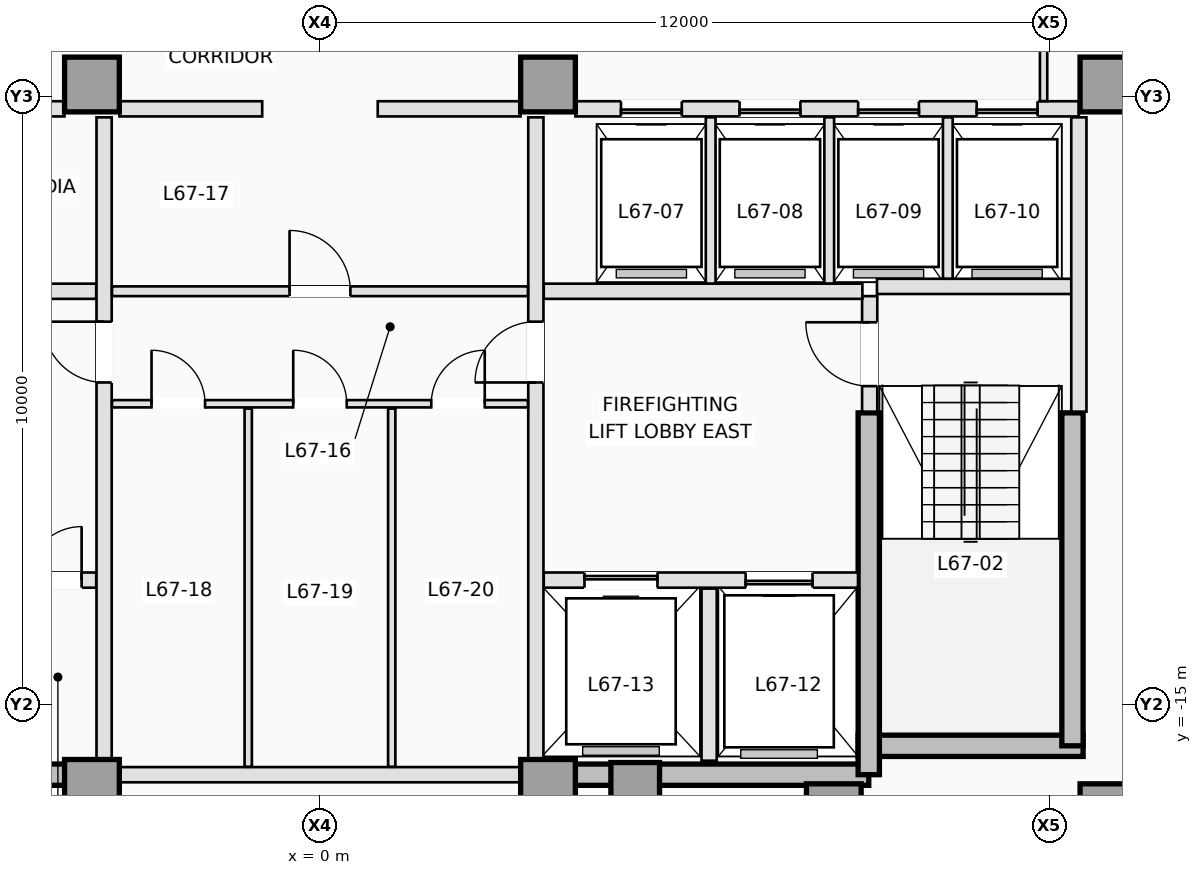
"""IFC4 building model, lengths in metres.
Left out: names, types, materials, properties, quantities, classifications, styles, units other than length and angle.
Written with IfcOpenShell. Run it as: python <this file> out.ifc"""

import sys

from ifc_helpers import new_model, si_unit, direction, frame, frame_2d, origin, origin_2d, place, context, subcontext, project, spatial, rectangle, extrude, element, fill, save


model = new_model("IFC4")
c1 = context("Model", 3, precision=1e-05, world=origin(), true_north=direction((0.0, 1.0)))
c2 = subcontext(c1, "Body", "Model", "MODEL_VIEW")
j1 = project(units=[si_unit("LENGTHUNIT", "METRE"), si_unit("PLANEANGLEUNIT", "RADIAN")], contexts=[c1])
p1 = place(None, origin())
s1 = spatial("IfcSite", under=j1, at=p1, CompositionType="ELEMENT")
p2 = place(p1, origin())
s2 = spatial("IfcBuilding", under=s1, at=p2, CompositionType="ELEMENT")
p3 = place(p2, frame((0.0, 0.0, 242.9)))
s3 = spatial("IfcBuildingStorey", under=s2, at=p3, CompositionType="ELEMENT", Elevation=242.9)
for number, where, z_axis, x_axis in (
    (1, (-9.025, -16.15, 0.0), (0.0, 0.0, 1.0), (1.0, 0.0, 0.0)),
    (2, (3.75, -16.15, 0.0), (0.0, 0.0, 1.0), (1.0, 0.0, 0.0)),
):
    element("IfcWall", number, at=place(p3, frame(where, z_axis=z_axis, x_axis=x_axis)), inside=s3, PredefinedType="SHEAR", context=c2, shape_type="SweptSolid", body=[
        extrude(rectangle(XDim=5.275, YDim=0.35, at=frame_2d((2.637, 0.0))), origin(), (0.0, 0.0, 1.0), 3.5),
    ])
p4 = place(p3, frame((8.85, -15.675, 0.0), z_axis=(0.0, 0.0, 1.0), x_axis=(1.0, 0.0, 0.0)))
e3 = element("IfcWall", 3, at=p4, inside=s3, PredefinedType="SHEAR", context=c2, shape_type="SweptSolid", body=[
    extrude(rectangle(XDim=3.7, YDim=0.35, at=frame_2d((1.85, 0.0))), origin(), (0.0, 0.0, 1.0), 3.5),
])
p5 = place(p3, frame((12.375, -15.675, 0.0), z_axis=(0.0, 0.0, 1.0), x_axis=(0.0, 1.0, 0.0)))
e4 = element("IfcWall", 4, at=p5, inside=s3, PredefinedType="SHEAR", context=c2, shape_type="SweptSolid", body=[
    extrude(rectangle(XDim=5.475, YDim=0.35, at=frame_2d((2.738, 0.0))), origin(), (0.0, 0.0, 1.0), 3.5),
])
p6 = place(p3, frame((9.025, -16.15, 0.0), z_axis=(0.0, 0.0, 1.0), x_axis=(0.0, 1.0, 0.0)))
e5 = element("IfcWall", 5, at=p6, inside=s3, PredefinedType="SHEAR", context=c2, shape_type="SweptSolid", body=[
    extrude(rectangle(XDim=5.95, YDim=0.35, at=frame_2d((2.975, 0.0))), origin(), (0.0, 0.0, 1.0), 3.5),
])
for number, where, z_axis, x_axis in (
    (6, (-3.75, -16.35, 0.0), (0.0, 0.0, 1.0), (1.0, 0.0, 0.0)),
    (7, (3.75, -16.35, 0.0), (0.0, 0.0, 1.0), (1.0, 0.0, 0.0)),
    (8, (8.45, -16.75, 0.0), (0.0, 0.0, 1.0), (1.0, 0.0, 0.0)),
    (9, (12.95, -16.75, 0.0), (0.0, 0.0, 1.0), (1.0, 0.0, 0.0)),
    (10, (-3.75, -4.8, 0.0), (0.0, 0.0, 1.0), (1.0, 0.0, 0.0)),
    (11, (3.75, -4.8, 0.0), (0.0, 0.0, 1.0), (1.0, 0.0, 0.0)),
    (12, (12.95, -4.8, 0.0), (0.0, 0.0, 1.0), (1.0, 0.0, 0.0)),
):
    element("IfcColumn", number, at=place(p3, frame(where, z_axis=z_axis, x_axis=x_axis)), inside=s3, PredefinedType="COLUMN", context=c2, shape_type="SweptSolid", body=[
        extrude(rectangle(XDim=0.9, YDim=0.9, at=origin_2d()), origin(), (0.0, 0.0, 1.0), 3.5),
    ])
p7 = place(p3, frame((5.184, -16.35, 0.0), z_axis=(0.0, 0.0, 1.0), x_axis=(0.0, 1.0, 0.0)))
e13 = element("IfcColumn", 13, at=p7, inside=s3, PredefinedType="COLUMN", context=c2, shape_type="SweptSolid", body=[
    extrude(rectangle(XDim=0.8, YDim=0.8, at=origin_2d()), origin(), (0.0, 0.0, 1.0), 3.5),
])
p8 = place(p3, frame((9.04, -10.18, 0.0), z_axis=(0.0, 0.0, 1.0), x_axis=(0.0, 1.0, 0.0)))
e14 = element("IfcWall", 14, at=p8, inside=s3, PredefinedType="PARTITIONING", context=c2, shape_type="SweptSolid", body=[
    extrude(rectangle(XDim=1.9, YDim=0.25, at=frame_2d((0.95, 0.0))), origin(), (0.0, 0.0, 1.0), 3.25),
])
p9 = place(p8, frame((0.42, 0.0, 0.0)))
e15 = element("IfcOpeningElement", 15, at=p9, cuts=e14, PredefinedType="OPENING", context=c2, shape_type="SweptSolid", body=[
    extrude(rectangle(XDim=1.05, YDim=2.15, at=frame_2d((0.525, 1.075))), frame((0.0, 0.135, 0.0), z_axis=(0.0, -1.0, 0.0), x_axis=(1.0, 0.0, 0.0)), (0.0, 0.0, 1.0), 0.27),
])
p10 = place(p3, frame((9.16, -8.12, 0.0), z_axis=(0.0, 0.0, 1.0), x_axis=(1.0, 0.0, 0.0)))
e16 = element("IfcWall", 16, at=p10, inside=s3, PredefinedType="PARTITIONING", context=c2, shape_type="SweptSolid", body=[
    extrude(rectangle(XDim=3.22, YDim=0.25, at=frame_2d((1.61, 0.0))), origin(), (0.0, 0.0, 1.0), 3.25),
])
p11 = place(p3, frame((12.48, -10.18, 0.0), z_axis=(0.0, 0.0, 1.0), x_axis=(0.0, 1.0, 0.0)))
e17 = element("IfcWall", 17, at=p11, inside=s3, PredefinedType="PARTITIONING", context=c2, shape_type="SweptSolid", body=[
    extrude(rectangle(XDim=4.84, YDim=0.25, at=frame_2d((2.42, 0.0))), origin(), (0.0, 0.0, 1.0), 3.25),
])
p12 = place(p3, frame((-8.848, -12.95, 0.0), z_axis=(0.0, 0.0, 1.0), x_axis=(1.0, 0.0, 0.0)))
e18 = element("IfcWall", 18, at=p12, inside=s3, PredefinedType="PARTITIONING", context=c2, shape_type="SweptSolid", body=[
    extrude(rectangle(XDim=5.168, YDim=0.25, at=frame_2d((2.584, 0.0))), origin(), (0.0, 0.0, 1.0), 3.25),
])
p13 = place(p12, frame((0.748, 0.0, 0.0)))
e19 = element("IfcOpeningElement", 19, at=p13, cuts=e18, PredefinedType="OPENING", context=c2, shape_type="SweptSolid", body=[
    extrude(rectangle(XDim=1.1, YDim=2.15, at=frame_2d((0.55, 1.075))), frame((0.0, 0.135, 0.0), z_axis=(0.0, -1.0, 0.0), x_axis=(1.0, 0.0, 0.0)), (0.0, 0.0, 1.0), 0.27),
])
p14 = place(p12, frame((2.648, 0.0, 0.0)))
e20 = element("IfcOpeningElement", 20, at=p14, cuts=e18, PredefinedType="OPENING", context=c2, shape_type="SweptSolid", body=[
    extrude(rectangle(XDim=0.88, YDim=2.1, at=frame_2d((0.44, 1.05))), frame((0.0, 0.135, 0.0), z_axis=(0.0, -1.0, 0.0), x_axis=(1.0, 0.0, 0.0)), (0.0, 0.0, 1.0), 0.27),
])
p15 = place(p12, frame((4.048, 0.0, 0.0)))
e21 = element("IfcOpeningElement", 21, at=p15, cuts=e18, PredefinedType="OPENING", context=c2, shape_type="SweptSolid", body=[
    extrude(rectangle(XDim=0.88, YDim=2.1, at=frame_2d((0.44, 1.05))), frame((0.0, 0.135, 0.0), z_axis=(0.0, -1.0, 0.0), x_axis=(1.0, 0.0, 0.0)), (0.0, 0.0, 1.0), 0.27),
])
p16 = place(p3, frame((3.68, -12.95, 0.0), z_axis=(0.0, 0.0, 1.0), x_axis=(1.0, 0.0, 0.0)))
e22 = element("IfcWall", 22, at=p16, inside=s3, PredefinedType="PARTITIONING", context=c2, shape_type="SweptSolid", body=[
    extrude(rectangle(XDim=5.168, YDim=0.25, at=frame_2d((2.584, 0.0))), origin(), (0.0, 0.0, 1.0), 3.25),
])
p17 = place(p16, frame((3.32, 0.0, 0.0)))
e23 = element("IfcOpeningElement", 23, at=p17, cuts=e22, PredefinedType="OPENING", context=c2, shape_type="SweptSolid", body=[
    extrude(rectangle(XDim=1.1, YDim=2.15, at=frame_2d((0.55, 1.075))), frame((0.0, 0.135, 0.0), z_axis=(0.0, -1.0, 0.0), x_axis=(1.0, 0.0, 0.0)), (0.0, 0.0, 1.0), 0.27),
])
p18 = place(p16, frame((0.67, 0.0, 0.0)))
e24 = element("IfcOpeningElement", 24, at=p18, cuts=e22, PredefinedType="OPENING", context=c2, shape_type="SweptSolid", body=[
    extrude(rectangle(XDim=1.2, YDim=2.15, at=frame_2d((0.6, 1.075))), frame((0.0, 0.135, 0.0), z_axis=(0.0, -1.0, 0.0), x_axis=(1.0, 0.0, 0.0)), (0.0, 0.0, 1.0), 0.27),
])
p19 = place(p3, frame((6.4, -15.92, 0.0), z_axis=(0.0, 0.0, 1.0), x_axis=(0.0, 1.0, 0.0)))
e25 = element("IfcWall", 25, at=p19, inside=s3, PredefinedType="PARTITIONING", context=c2, shape_type="SweptSolid", body=[
    extrude(rectangle(XDim=2.83, YDim=0.25, at=frame_2d((1.415, 0.0))), origin(), (0.0, 0.0, 1.0), 3.25),
])
for number, where, z_axis, x_axis in (
    (26, (-8.92, -8.2, 0.0), (0.0, 0.0, 1.0), (1.0, 0.0, 0.0)),
    (27, (3.68, -8.2, 0.0), (0.0, 0.0, 1.0), (1.0, 0.0, 0.0)),
):
    element("IfcWall", number, at=place(p3, frame(where, z_axis=z_axis, x_axis=x_axis)), inside=s3, PredefinedType="PARTITIONING", context=c2, shape_type="SweptSolid", body=[
        extrude(rectangle(XDim=5.24, YDim=0.25, at=frame_2d((2.62, 0.0))), origin(), (0.0, 0.0, 1.0), 3.25),
    ])
p20 = place(p3, frame((-3.55, -15.898, 0.0), z_axis=(0.0, 0.0, 1.0), x_axis=(0.0, 1.0, 0.0)))
e28 = element("IfcWall", 28, at=p20, inside=s3, PredefinedType="PARTITIONING", context=c2, shape_type="SweptSolid", body=[
    extrude(rectangle(XDim=10.558, YDim=0.25, at=frame_2d((5.279, 0.0))), origin(), (0.0, 0.0, 1.0), 3.25),
])
p21 = place(p20, frame((6.198, 0.0, 0.0)))
e29 = element("IfcOpeningElement", 29, at=p21, cuts=e28, PredefinedType="OPENING", context=c2, shape_type="SweptSolid", body=[
    extrude(rectangle(XDim=1.0, YDim=2.15, at=frame_2d((0.5, 1.075))), frame((0.0, 0.135, 0.0), z_axis=(0.0, -1.0, 0.0), x_axis=(1.0, 0.0, 0.0)), (0.0, 0.0, 1.0), 0.27),
])
p22 = place(p3, frame((3.55, -15.898, 0.0), z_axis=(0.0, 0.0, 1.0), x_axis=(0.0, 1.0, 0.0)))
e30 = element("IfcWall", 30, at=p22, inside=s3, PredefinedType="PARTITIONING", context=c2, shape_type="SweptSolid", body=[
    extrude(rectangle(XDim=10.558, YDim=0.25, at=frame_2d((5.279, 0.0))), origin(), (0.0, 0.0, 1.0), 3.25),
])
p23 = place(p22, frame((6.198, 0.0, 0.0)))
e31 = element("IfcOpeningElement", 31, at=p23, cuts=e30, PredefinedType="OPENING", context=c2, shape_type="SweptSolid", body=[
    extrude(rectangle(XDim=1.0, YDim=2.15, at=frame_2d((0.5, 1.075))), frame((0.0, 0.135, 0.0), z_axis=(0.0, -1.0, 0.0), x_axis=(1.0, 0.0, 0.0)), (0.0, 0.0, 1.0), 0.27),
])
p24 = place(p3, frame((-12.48, -5.2, 0.0), z_axis=(0.0, 0.0, 1.0), x_axis=(1.0, 0.0, 0.0)))
e32 = element("IfcWall", 32, at=p24, inside=s3, PredefinedType="PARTITIONING", context=c2, shape_type="SweptSolid", body=[
    extrude(rectangle(XDim=8.278, YDim=0.25, at=frame_2d((4.139, 0.0))), origin(), (0.0, 0.0, 1.0), 3.25),
])
p25 = place(p24, frame((3.05, 0.0, 0.0)))
e33 = element("IfcOpeningElement", 33, at=p25, cuts=e32, PredefinedType="OPENING", context=c2, shape_type="SweptSolid", body=[
    extrude(rectangle(XDim=0.92, YDim=2.12, at=frame_2d((0.46, 1.06))), frame((0.0, 0.135, 0.0), z_axis=(0.0, -1.0, 0.0), x_axis=(1.0, 0.0, 0.0)), (0.0, 0.0, 1.0), 0.27),
])
p26 = place(p24, frame((6.15, 0.0, 0.0)))
e34 = element("IfcOpeningElement", 34, at=p26, cuts=e32, PredefinedType="OPENING", context=c2, shape_type="SweptSolid", body=[
    extrude(rectangle(XDim=0.92, YDim=2.12, at=frame_2d((0.46, 1.06))), frame((0.0, 0.135, 0.0), z_axis=(0.0, -1.0, 0.0), x_axis=(1.0, 0.0, 0.0)), (0.0, 0.0, 1.0), 0.27),
])
p27 = place(p3, frame((4.202, -5.2, 0.0), z_axis=(0.0, 0.0, 1.0), x_axis=(1.0, 0.0, 0.0)))
e35 = element("IfcWall", 35, at=p27, inside=s3, PredefinedType="PARTITIONING", context=c2, shape_type="SweptSolid", body=[
    extrude(rectangle(XDim=8.278, YDim=0.25, at=frame_2d((4.139, 0.0))), origin(), (0.0, 0.0, 1.0), 3.25),
])
p28 = place(p27, frame((0.748, 0.0, 0.0)))
e36 = element("IfcOpeningElement", 36, at=p28, cuts=e35, PredefinedType="OPENING", context=c2, shape_type="SweptSolid", body=[
    extrude(rectangle(XDim=1.0, YDim=2.15, at=frame_2d((0.5, 1.075))), frame((0.0, 0.135, 0.0), z_axis=(0.0, -1.0, 0.0), x_axis=(1.0, 0.0, 0.0)), (0.0, 0.0, 1.0), 0.27),
])
p29 = place(p27, frame((2.698, 0.0, 0.0)))
e37 = element("IfcOpeningElement", 37, at=p29, cuts=e35, PredefinedType="OPENING", context=c2, shape_type="SweptSolid", body=[
    extrude(rectangle(XDim=1.0, YDim=2.15, at=frame_2d((0.5, 1.075))), frame((0.0, 0.135, 0.0), z_axis=(0.0, -1.0, 0.0), x_axis=(1.0, 0.0, 0.0)), (0.0, 0.0, 1.0), 0.27),
])
p30 = place(p27, frame((4.648, 0.0, 0.0)))
e38 = element("IfcOpeningElement", 38, at=p30, cuts=e35, PredefinedType="OPENING", context=c2, shape_type="SweptSolid", body=[
    extrude(rectangle(XDim=1.0, YDim=2.15, at=frame_2d((0.5, 1.075))), frame((0.0, 0.135, 0.0), z_axis=(0.0, -1.0, 0.0), x_axis=(1.0, 0.0, 0.0)), (0.0, 0.0, 1.0), 0.27),
])
p31 = place(p27, frame((6.598, 0.0, 0.0)))
e39 = element("IfcOpeningElement", 39, at=p31, cuts=e35, PredefinedType="OPENING", context=c2, shape_type="SweptSolid", body=[
    extrude(rectangle(XDim=1.0, YDim=2.15, at=frame_2d((0.5, 1.075))), frame((0.0, 0.135, 0.0), z_axis=(0.0, -1.0, 0.0), x_axis=(1.0, 0.0, 0.0)), (0.0, 0.0, 1.0), 0.27),
])
for number, where, z_axis, x_axis in (
    (40, (-3.298, -5.2, 0.0), (0.0, 0.0, 1.0), (1.0, 0.0, 0.0)),
    (41, (0.95, -5.2, 0.0), (0.0, 0.0, 1.0), (1.0, 0.0, 0.0)),
):
    element("IfcWall", number, at=place(p3, frame(where, z_axis=z_axis, x_axis=x_axis)), inside=s3, PredefinedType="PARTITIONING", context=c2, shape_type="SweptSolid", body=[
        extrude(rectangle(XDim=2.348, YDim=0.25, at=frame_2d((1.174, 0.0))), origin(), (0.0, 0.0, 1.0), 3.25),
    ])
for number, where, z_axis, x_axis in (
    (42, (6.425, -8.073, 0.0), (0.0, 0.0, 1.0), (0.0, 1.0, 0.0)),
    (43, (8.375, -8.073, 0.0), (0.0, 0.0, 1.0), (0.0, 1.0, 0.0)),
):
    element("IfcWall", number, at=place(p3, frame(where, z_axis=z_axis, x_axis=x_axis)), inside=s3, PredefinedType="PARTITIONING", context=c2, shape_type="SweptSolid", body=[
        extrude(rectangle(XDim=2.733, YDim=0.16, at=frame_2d((1.366, 0.0))), origin(), (0.0, 0.0, 1.0), 3.25),
    ])
p32 = place(p3, frame((10.325, -7.993, 0.0), z_axis=(0.0, 0.0, 1.0), x_axis=(0.0, 1.0, 0.0)))
e44 = element("IfcWall", 44, at=p32, inside=s3, PredefinedType="PARTITIONING", context=c2, shape_type="SweptSolid", body=[
    extrude(rectangle(XDim=2.653, YDim=0.16, at=frame_2d((1.326, 0.0))), origin(), (0.0, 0.0, 1.0), 3.25),
])
p33 = place(p3, frame((-3.298, -16.15, 0.0), z_axis=(0.0, 0.0, 1.0), x_axis=(1.0, 0.0, 0.0)))
e45 = element("IfcWall", 45, at=p33, inside=s3, PredefinedType="PARTITIONING", context=c2, shape_type="SweptSolid", body=[
    extrude(rectangle(XDim=6.596, YDim=0.25, at=frame_2d((3.298, 0.0))), origin(), (0.0, 0.0, 1.0), 2.844),
])
p34 = place(p3, frame((-3.42, -8.2, 0.0), z_axis=(0.0, 0.0, 1.0), x_axis=(1.0, 0.0, 0.0)))
e46 = element("IfcWall", 46, at=p34, inside=s3, PredefinedType="PARTITIONING", context=c2, shape_type="SweptSolid", body=[
    extrude(rectangle(XDim=6.84, YDim=0.16, at=frame_2d((3.42, 0.0))), origin(), (0.0, 0.0, 1.0), 3.25),
])
p35 = place(p34, frame((2.92, 0.0, 0.0)))
e47 = element("IfcOpeningElement", 47, at=p35, cuts=e46, PredefinedType="OPENING", context=c2, shape_type="SweptSolid", body=[
    extrude(rectangle(XDim=1.0, YDim=2.15, at=frame_2d((0.5, 1.075))), frame((0.0, 0.09, 0.0), z_axis=(0.0, -1.0, 0.0), x_axis=(1.0, 0.0, 0.0)), (0.0, 0.0, 1.0), 0.18),
])
p36 = place(p3, frame((-3.42, -10.05, 0.0), z_axis=(0.0, 0.0, 1.0), x_axis=(1.0, 0.0, 0.0)))
e48 = element("IfcWall", 48, at=p36, inside=s3, PredefinedType="PARTITIONING", context=c2, shape_type="SweptSolid", body=[
    extrude(rectangle(XDim=6.84, YDim=0.12, at=frame_2d((3.42, 0.0))), origin(), (0.0, 0.0, 1.0), 3.25),
])
p37 = place(p36, frame((0.65, 0.0, 0.0)))
e49 = element("IfcOpeningElement", 49, at=p37, cuts=e48, PredefinedType="OPENING", context=c2, shape_type="SweptSolid", body=[
    extrude(rectangle(XDim=0.88, YDim=2.12, at=frame_2d((0.44, 1.06))), frame((0.0, 0.07, 0.0), z_axis=(0.0, -1.0, 0.0), x_axis=(1.0, 0.0, 0.0)), (0.0, 0.0, 1.0), 0.14),
])
p38 = place(p36, frame((2.98, 0.0, 0.0)))
e50 = element("IfcOpeningElement", 50, at=p38, cuts=e48, PredefinedType="OPENING", context=c2, shape_type="SweptSolid", body=[
    extrude(rectangle(XDim=0.88, YDim=2.12, at=frame_2d((0.44, 1.06))), frame((0.0, 0.07, 0.0), z_axis=(0.0, -1.0, 0.0), x_axis=(1.0, 0.0, 0.0)), (0.0, 0.0, 1.0), 0.14),
])
p39 = place(p36, frame((5.25, 0.0, 0.0)))
e51 = element("IfcOpeningElement", 51, at=p39, cuts=e48, PredefinedType="OPENING", context=c2, shape_type="SweptSolid", body=[
    extrude(rectangle(XDim=0.88, YDim=2.12, at=frame_2d((0.44, 1.06))), frame((0.0, 0.07, 0.0), z_axis=(0.0, -1.0, 0.0), x_axis=(1.0, 0.0, 0.0)), (0.0, 0.0, 1.0), 0.14),
])
for number, where, z_axis, x_axis in (
    (52, (-1.18, -16.02, 0.0), (0.0, 0.0, 1.0), (0.0, 1.0, 0.0)),
    (53, (1.18, -16.02, 0.0), (0.0, 0.0, 1.0), (0.0, 1.0, 0.0)),
):
    element("IfcWall", number, at=place(p3, frame(where, z_axis=z_axis, x_axis=x_axis)), inside=s3, PredefinedType="PARTITIONING", context=c2, shape_type="SweptSolid", body=[
        extrude(rectangle(XDim=5.89, YDim=0.12, at=frame_2d((2.945, 0.0))), origin(), (0.0, 0.0, 1.0), 3.25),
    ])
p40 = place(p3, frame((11.9, -2.792, 0.0), z_axis=(0.0, 0.0, 1.0), x_axis=(0.0, -1.0, 0.0)))
e54 = element("IfcWall", 54, at=p40, inside=s3, PredefinedType="PARTITIONING", context=c2, shape_type="SweptSolid", body=[
    extrude(rectangle(XDim=2.281, YDim=0.12, at=frame_2d((1.141, 0.0))), origin(), (0.0, 0.0, 1.0), 3.25),
])
p41 = place(p28, origin())
e55 = element("IfcDoor", 55, at=p41, inside=s3, OperationType="SLIDING_TO_RIGHT", PredefinedType="DOOR", context=c2, shape_type="SweptSolid", body=[
    extrude(rectangle(XDim=1.0, YDim=2.15, at=frame_2d((0.5, 1.075))), frame((0.0, 0.025, 0.0), z_axis=(0.0, -1.0, 0.0), x_axis=(1.0, 0.0, 0.0)), (0.0, 0.0, 1.0), 0.05),
])
fill(e36, e55)
p42 = place(p29, origin())
e56 = element("IfcDoor", 56, at=p42, inside=s3, OperationType="SLIDING_TO_RIGHT", PredefinedType="DOOR", context=c2, shape_type="SweptSolid", body=[
    extrude(rectangle(XDim=1.0, YDim=2.15, at=frame_2d((0.5, 1.075))), frame((0.0, 0.025, 0.0), z_axis=(0.0, -1.0, 0.0), x_axis=(1.0, 0.0, 0.0)), (0.0, 0.0, 1.0), 0.05),
])
fill(e37, e56)
p43 = place(p30, origin())
e57 = element("IfcDoor", 57, at=p43, inside=s3, OperationType="SLIDING_TO_RIGHT", PredefinedType="DOOR", context=c2, shape_type="SweptSolid", body=[
    extrude(rectangle(XDim=1.0, YDim=2.15, at=frame_2d((0.5, 1.075))), frame((0.0, 0.025, 0.0), z_axis=(0.0, -1.0, 0.0), x_axis=(1.0, 0.0, 0.0)), (0.0, 0.0, 1.0), 0.05),
])
fill(e38, e57)
p44 = place(p31, origin())
e58 = element("IfcDoor", 58, at=p44, inside=s3, OperationType="SLIDING_TO_RIGHT", PredefinedType="DOOR", context=c2, shape_type="SweptSolid", body=[
    extrude(rectangle(XDim=1.0, YDim=2.15, at=frame_2d((0.5, 1.075))), frame((0.0, 0.025, 0.0), z_axis=(0.0, -1.0, 0.0), x_axis=(1.0, 0.0, 0.0)), (0.0, 0.0, 1.0), 0.05),
])
fill(e39, e58)
p45 = place(p17, origin())
e59 = element("IfcDoor", 59, at=p45, inside=s3, OperationType="SLIDING_TO_RIGHT", PredefinedType="DOOR", context=c2, shape_type="SweptSolid", body=[
    extrude(rectangle(XDim=1.1, YDim=2.15, at=frame_2d((0.55, 1.075))), frame((0.0, 0.025, 0.0), z_axis=(0.0, -1.0, 0.0), x_axis=(1.0, 0.0, 0.0)), (0.0, 0.0, 1.0), 0.05),
])
fill(e23, e59)
p46 = place(p18, origin())
e60 = element("IfcDoor", 60, at=p46, inside=s3, OperationType="SLIDING_TO_LEFT", PredefinedType="DOOR", context=c2, shape_type="SweptSolid", body=[
    extrude(rectangle(XDim=1.2, YDim=2.15, at=frame_2d((0.6, 1.075))), frame((0.0, 0.025, 0.0), z_axis=(0.0, -1.0, 0.0), x_axis=(1.0, 0.0, 0.0)), (0.0, 0.0, 1.0), 0.05),
])
fill(e24, e60)
p47 = place(p9, origin())
e61 = element("IfcDoor", 61, at=p47, inside=s3, OperationType="SINGLE_SWING_RIGHT", PredefinedType="DOOR", context=c2, shape_type="SweptSolid", body=[
    extrude(rectangle(XDim=1.05, YDim=2.15, at=frame_2d((0.525, 1.075))), frame((0.0, 0.025, 0.0), z_axis=(0.0, -1.0, 0.0), x_axis=(1.0, 0.0, 0.0)), (0.0, 0.0, 1.0), 0.05),
])
fill(e15, e61)
p48 = place(p15, origin())
e62 = element("IfcDoor", 62, at=p48, inside=s3, OperationType="SINGLE_SWING_RIGHT", PredefinedType="TRAPDOOR", context=c2, shape_type="SweptSolid", body=[
    extrude(rectangle(XDim=0.88, YDim=2.1, at=frame_2d((0.44, 1.05))), frame((0.0, 0.025, 0.0), z_axis=(0.0, -1.0, 0.0), x_axis=(1.0, 0.0, 0.0)), (0.0, 0.0, 1.0), 0.05),
])
fill(e21, e62)
p49 = place(p21, origin())
e63 = element("IfcDoor", 63, at=p49, inside=s3, OperationType="SINGLE_SWING_RIGHT", PredefinedType="DOOR", context=c2, shape_type="SweptSolid", body=[
    extrude(rectangle(XDim=1.0, YDim=2.15, at=frame_2d((0.5, 1.075))), frame((0.0, 0.025, 0.0), z_axis=(0.0, -1.0, 0.0), x_axis=(1.0, 0.0, 0.0)), (0.0, 0.0, 1.0), 0.05),
])
fill(e29, e63)
p50 = place(p23, origin())
e64 = element("IfcDoor", 64, at=p50, inside=s3, OperationType="SINGLE_SWING_LEFT", PredefinedType="DOOR", context=c2, shape_type="SweptSolid", body=[
    extrude(rectangle(XDim=1.0, YDim=2.15, at=frame_2d((0.5, 1.075))), frame((0.0, 0.025, 0.0), z_axis=(0.0, -1.0, 0.0), x_axis=(1.0, 0.0, 0.0)), (0.0, 0.0, 1.0), 0.05),
])
fill(e31, e64)
p51 = place(p35, origin())
e65 = element("IfcDoor", 65, at=p51, inside=s3, OperationType="SINGLE_SWING_LEFT", PredefinedType="DOOR", context=c2, shape_type="SweptSolid", body=[
    extrude(rectangle(XDim=1.0, YDim=2.15, at=frame_2d((0.5, 1.075))), frame((0.0, 0.025, 0.0), z_axis=(0.0, -1.0, 0.0), x_axis=(1.0, 0.0, 0.0)), (0.0, 0.0, 1.0), 0.05),
])
fill(e47, e65)
p52 = place(p37, origin())
e66 = element("IfcDoor", 66, at=p52, inside=s3, OperationType="SINGLE_SWING_LEFT", PredefinedType="DOOR", context=c2, shape_type="SweptSolid", body=[
    extrude(rectangle(XDim=0.88, YDim=2.12, at=frame_2d((0.44, 1.06))), frame((0.0, 0.025, 0.0), z_axis=(0.0, -1.0, 0.0), x_axis=(1.0, 0.0, 0.0)), (0.0, 0.0, 1.0), 0.05),
])
fill(e49, e66)
p53 = place(p38, origin())
e67 = element("IfcDoor", 67, at=p53, inside=s3, OperationType="SINGLE_SWING_LEFT", PredefinedType="DOOR", context=c2, shape_type="SweptSolid", body=[
    extrude(rectangle(XDim=0.88, YDim=2.12, at=frame_2d((0.44, 1.06))), frame((0.0, 0.025, 0.0), z_axis=(0.0, -1.0, 0.0), x_axis=(1.0, 0.0, 0.0)), (0.0, 0.0, 1.0), 0.05),
])
fill(e50, e67)
p54 = place(p39, origin())
e68 = element("IfcDoor", 68, at=p54, inside=s3, OperationType="SINGLE_SWING_RIGHT", PredefinedType="DOOR", context=c2, shape_type="SweptSolid", body=[
    extrude(rectangle(XDim=0.88, YDim=2.12, at=frame_2d((0.44, 1.06))), frame((0.0, 0.025, 0.0), z_axis=(0.0, -1.0, 0.0), x_axis=(1.0, 0.0, 0.0)), (0.0, 0.0, 1.0), 0.05),
])
fill(e51, e68)
save(model, sys.argv[1])
